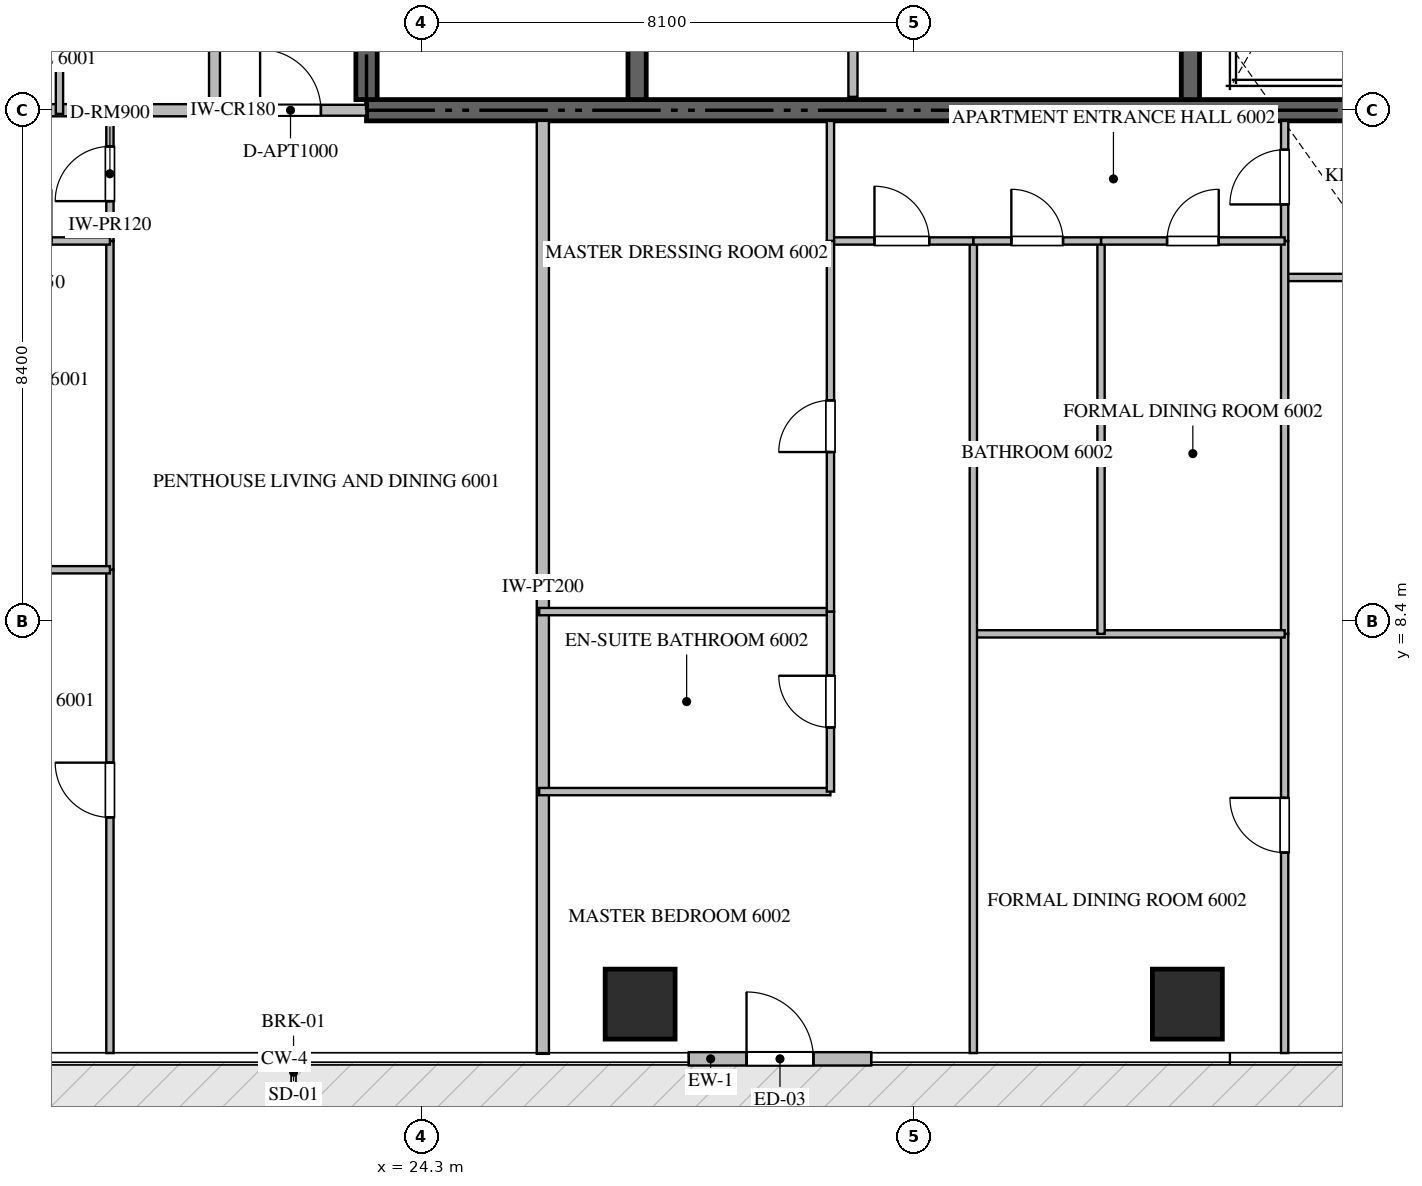
"""IFC4 building model, lengths in metres.
Left out: names, types, materials, properties, quantities, classifications, styles, units other than length and angle.
Written with IfcOpenShell. Run it as: python <this file> out.ifc"""

import sys

from ifc_helpers import new_model, si_unit, direction, frame, frame_2d, origin, origin_2d, place, context, subcontext, project, spatial, rectangle, extrude, source, transform, mapped, element, fill, save


model = new_model("IFC4")
c1 = context("Model", 3, precision=1e-05, world=origin(), true_north=direction((0.0, 1.0)))
c2 = subcontext(c1, "Body", "Model", "MODEL_VIEW")
j1 = project(units=[si_unit("LENGTHUNIT", "METRE"), si_unit("PLANEANGLEUNIT", "RADIAN")], contexts=[c1])
p1 = place(None, origin())
s1 = spatial("IfcSite", under=j1, at=p1, CompositionType="ELEMENT")
p2 = place(p1, origin())
s2 = spatial("IfcBuilding", under=s1, at=p2, CompositionType="ELEMENT")
p3 = place(p2, frame((0.0, 0.0, 241.25)))
s3 = spatial("IfcBuildingStorey", under=s2, at=p3, CompositionType="ELEMENT", Elevation=241.25)
p4 = place(p3, frame((23.4, 16.8, -0.26), z_axis=(0.0, 0.0, 1.0), x_axis=(1.0, 0.0, 0.0)))
e1 = element("IfcWall", 1, at=p4, inside=s3, PredefinedType="SHEAR", context=c2, shape_type="SweptSolid", body=[
    extrude(rectangle(XDim=18.0, YDim=0.35, at=frame_2d((9.0, 0.0))), origin(), (0.0, 0.0, 1.0), 3.848),
])
p5 = place(p3, frame((23.4, 16.975, -0.26), z_axis=(0.0, 0.0, 1.0), x_axis=(0.0, 1.0, 0.0)))
e2 = element("IfcWall", 2, at=p5, inside=s3, PredefinedType="SHEAR", context=c2, shape_type="SweptSolid", body=[
    extrude(rectangle(XDim=4.875, YDim=0.35, at=frame_2d((2.438, 0.0))), origin(), (0.0, 0.0, 1.0), 3.848),
])
p6 = place(p3, frame((27.85, 16.975, -0.26), z_axis=(0.0, 0.0, 1.0), x_axis=(0.0, 1.0, 0.0)))
e3 = element("IfcWall", 3, at=p6, inside=s3, PredefinedType="SHEAR", context=c2, shape_type="SweptSolid", body=[
    extrude(rectangle(XDim=4.875, YDim=0.3, at=frame_2d((2.438, 0.0))), origin(), (0.0, 0.0, 1.0), 3.848),
])
p7 = place(p3, frame((36.95, 16.975, -0.26), z_axis=(0.0, 0.0, 1.0), x_axis=(0.0, 1.0, 0.0)))
e4 = element("IfcWall", 4, at=p7, inside=s3, PredefinedType="SHEAR", context=c2, shape_type="SweptSolid", body=[
    extrude(rectangle(XDim=8.375, YDim=0.3, at=frame_2d((4.188, 0.0))), origin(), (0.0, 0.0, 1.0), 3.848),
])
m1 = source(origin(), c2, "Body", "SweptSolid", [
    extrude(rectangle(XDim=1.15, YDim=1.15, at=origin_2d()), origin(), (0.0, 0.0, 1.0), 3.85),
])
for number, where, z_axis, x_axis in (
    (5, (27.9, 2.1, -0.26), (0.0, 0.0, 1.0), (1.0, 0.0, 0.0)),
    (6, (36.9, 2.1, -0.26), (0.0, 0.0, 1.0), (1.0, 0.0, 0.0)),
):
    element("IfcColumn", number, at=place(p3, frame(where, z_axis=z_axis, x_axis=x_axis)), inside=s3, PredefinedType="COLUMN", context=c2, shape_type="MappedRepresentation", body=[
        mapped(m1, transform((0.0, 0.0, 0.0), scale=1.0)),
    ])
p8 = place(p3, frame((28.7, 1.2, 0.0), z_axis=(0.0, 0.0, 1.0), x_axis=(1.0, 0.0, 0.0)))
e7 = element("IfcWall", 7, at=p8, inside=s3, PredefinedType="ELEMENTEDWALL", context=c2, shape_type="SweptSolid", body=[
    extrude(rectangle(XDim=3.0, YDim=0.22, at=frame_2d((1.5, 0.0))), origin(), (0.0, 0.0, 1.0), 3.575),
])
p9 = place(p8, frame((0.95, 0.0, 0.0)))
e8 = element("IfcOpeningElement", 8, at=p9, cuts=e7, PredefinedType="OPENING", context=c2, shape_type="SweptSolid", body=[
    extrude(rectangle(XDim=1.1, YDim=2.2, at=frame_2d((0.55, 1.1))), frame((0.0, 0.12, 0.0), z_axis=(0.0, -1.0, 0.0), x_axis=(1.0, 0.0, 0.0)), (0.0, 0.0, 1.0), 0.24),
])
p10 = place(p3, frame((31.4, 17.02, 0.0), z_axis=(0.0, 0.0, 1.0), x_axis=(0.0, 1.0, 0.0)))
e9 = element("IfcWall", 9, at=p10, inside=s3, PredefinedType="PARTITIONING", context=c2, shape_type="SweptSolid", body=[
    extrude(rectangle(XDim=2.73, YDim=0.15, at=frame_2d((1.365, 0.0))), origin(), (0.0, 0.0, 1.0), 3.59),
])
p11 = place(p3, frame((26.3, 1.282, 0.0), z_axis=(0.0, 0.0, 1.0), x_axis=(0.0, 1.0, 0.0)))
e10 = element("IfcWall", 10, at=p11, inside=s3, PredefinedType="PARTITIONING", context=c2, shape_type="SweptSolid", body=[
    extrude(rectangle(XDim=15.343, YDim=0.2, at=frame_2d((7.671, 0.0))), origin(), (0.0, 0.0, 1.0), 3.59),
])
p12 = place(p3, frame((7.482, 16.8, 0.0), z_axis=(0.0, 0.0, 1.0), x_axis=(1.0, 0.0, 0.0)))
e11 = element("IfcWall", 11, at=p12, inside=s3, PredefinedType="PARTITIONING", context=c2, shape_type="SweptSolid", body=[
    extrude(rectangle(XDim=13.418, YDim=0.2, at=frame_2d((6.709, 0.0))), origin(), (0.0, 0.0, 1.0), 3.59),
])
p13 = place(p3, frame((20.902, 16.8, 0.0), z_axis=(0.0, 0.0, 1.0), x_axis=(1.0, 0.0, 0.0)))
e12 = element("IfcWall", 12, at=p13, inside=s3, PredefinedType="PARTITIONING", context=c2, shape_type="SweptSolid", body=[
    extrude(rectangle(XDim=2.496, YDim=0.18, at=frame_2d((1.248, 0.0))), origin(), (0.0, 0.0, 1.0), 3.59),
])
p14 = place(p13, frame((0.748, 0.0, 0.0)))
e13 = element("IfcOpeningElement", 13, at=p14, cuts=e12, PredefinedType="OPENING", context=c2, shape_type="SweptSolid", body=[
    extrude(rectangle(XDim=1.0, YDim=2.15, at=frame_2d((0.5, 1.075))), frame((0.0, 0.1, 0.0), z_axis=(0.0, -1.0, 0.0), x_axis=(1.0, 0.0, 0.0)), (0.0, 0.0, 1.0), 0.2),
])
p15 = place(p3, frame((20.9, 16.8, 0.0), z_axis=(0.0, 0.0, 1.0), x_axis=(0.0, 1.0, 0.0)))
e14 = element("IfcWall", 14, at=p15, inside=s3, PredefinedType="PARTITIONING", context=c2, shape_type="SweptSolid", body=[
    extrude(rectangle(XDim=16.8, YDim=0.18, at=frame_2d((8.4, 0.0))), origin(), (0.0, 0.0, 1.0), 3.59),
])
p16 = place(p15, frame((4.993, 0.0, 0.0)))
e15 = element("IfcOpeningElement", 15, at=p16, cuts=e14, PredefinedType="OPENING", context=c2, shape_type="SweptSolid", body=[
    extrude(rectangle(XDim=1.0, YDim=2.15, at=frame_2d((0.5, 1.075))), frame((0.0, 0.1, 0.0), z_axis=(0.0, -1.0, 0.0), x_axis=(1.0, 0.0, 0.0)), (0.0, 0.0, 1.0), 0.2),
])
p17 = place(p15, frame((13.351, 0.0, 0.0)))
e16 = element("IfcOpeningElement", 16, at=p17, cuts=e14, PredefinedType="OPENING", context=c2, shape_type="SweptSolid", body=[
    extrude(rectangle(XDim=1.0, YDim=2.15, at=frame_2d((0.5, 1.075))), frame((0.0, 0.1, 0.0), z_axis=(0.0, -1.0, 0.0), x_axis=(1.0, 0.0, 0.0)), (0.0, 0.0, 1.0), 0.2),
])
p18 = place(p3, frame((19.18, 14.65, 0.0), z_axis=(0.0, 0.0, 1.0), x_axis=(0.0, 1.0, 0.0)))
e17 = element("IfcWall", 17, at=p18, inside=s3, PredefinedType="PARTITIONING", context=c2, shape_type="SweptSolid", body=[
    extrude(rectangle(XDim=2.21, YDim=0.12, at=frame_2d((1.105, 0.0))), origin(), (0.0, 0.0, 1.0), 3.59),
])
p19 = place(p18, frame((0.655, 0.0, 0.0)))
e18 = element("IfcOpeningElement", 18, at=p19, cuts=e17, PredefinedType="OPENING", context=c2, shape_type="SweptSolid", body=[
    extrude(rectangle(XDim=0.9, YDim=2.1, at=frame_2d((0.45, 1.05))), frame((0.0, 0.07, 0.0), z_axis=(0.0, -1.0, 0.0), x_axis=(1.0, 0.0, 0.0)), (0.0, 0.0, 1.0), 0.14),
])
p20 = place(p3, frame((19.18, 1.295, 0.0), z_axis=(0.0, 0.0, 1.0), x_axis=(0.0, 1.0, 0.0)))
e19 = element("IfcWall", 19, at=p20, inside=s3, PredefinedType="PARTITIONING", context=c2, shape_type="SweptSolid", body=[
    extrude(rectangle(XDim=7.948, YDim=0.12, at=frame_2d((3.974, 0.0))), origin(), (0.0, 0.0, 1.0), 3.59),
])
p21 = place(p20, frame((3.876, 0.0, 0.0)))
e20 = element("IfcOpeningElement", 20, at=p21, cuts=e19, PredefinedType="OPENING", context=c2, shape_type="SweptSolid", body=[
    extrude(rectangle(XDim=0.9, YDim=2.1, at=frame_2d((0.45, 1.05))), frame((0.0, 0.07, 0.0), z_axis=(0.0, -1.0, 0.0), x_axis=(1.0, 0.0, 0.0)), (0.0, 0.0, 1.0), 0.14),
])
p22 = place(p3, frame((19.18, 9.245, 0.0), z_axis=(0.0, 0.0, 1.0), x_axis=(0.0, 1.0, 0.0)))
e21 = element("IfcWall", 21, at=p22, inside=s3, PredefinedType="PARTITIONING", context=c2, shape_type="SweptSolid", body=[
    extrude(rectangle(XDim=5.403, YDim=0.12, at=frame_2d((2.701, 0.0))), origin(), (0.0, 0.0, 1.0), 3.59),
])
p23 = place(p3, frame((14.3, 9.243, 0.0), z_axis=(0.0, 0.0, 1.0), x_axis=(1.0, 0.0, 0.0)))
e22 = element("IfcWall", 22, at=p23, inside=s3, PredefinedType="PARTITIONING", context=c2, shape_type="SweptSolid", body=[
    extrude(rectangle(XDim=4.88, YDim=0.12, at=frame_2d((2.44, 0.0))), origin(), (0.0, 0.0, 1.0), 3.59),
])
p24 = place(p3, frame((16.402, 14.65, 0.0), z_axis=(0.0, 0.0, 1.0), x_axis=(1.0, 0.0, 0.0)))
e23 = element("IfcWall", 23, at=p24, inside=s3, PredefinedType="PARTITIONING", context=c2, shape_type="SweptSolid", body=[
    extrude(rectangle(XDim=2.778, YDim=0.12, at=frame_2d((1.389, 0.0))), origin(), (0.0, 0.0, 1.0), 3.59),
])
p25 = place(p24, frame((0.964, 0.0, 0.0)))
e24 = element("IfcOpeningElement", 24, at=p25, cuts=e23, PredefinedType="OPENING", context=c2, shape_type="SweptSolid", body=[
    extrude(rectangle(XDim=0.85, YDim=2.1, at=frame_2d((0.425, 1.05))), frame((0.0, 0.07, 0.0), z_axis=(0.0, -1.0, 0.0), x_axis=(1.0, 0.0, 0.0)), (0.0, 0.0, 1.0), 0.14),
])
p26 = place(p3, frame((38.5, 14.05, 0.0), z_axis=(0.0, 0.0, 1.0), x_axis=(1.0, 0.0, 0.0)))
e25 = element("IfcWall", 25, at=p26, inside=s3, PredefinedType="PARTITIONING", context=c2, shape_type="SweptSolid", body=[
    extrude(rectangle(XDim=2.85, YDim=0.12, at=frame_2d((1.425, 0.0))), origin(), (0.0, 0.0, 1.0), 3.59),
])
p27 = place(p26, frame((1.0, 0.0, 0.0)))
e26 = element("IfcOpeningElement", 26, at=p27, cuts=e25, PredefinedType="OPENING", context=c2, shape_type="SweptSolid", body=[
    extrude(rectangle(XDim=0.85, YDim=2.1, at=frame_2d((0.425, 1.05))), frame((0.0, 0.07, 0.0), z_axis=(0.0, -1.0, 0.0), x_axis=(1.0, 0.0, 0.0)), (0.0, 0.0, 1.0), 0.14),
])
p28 = place(p3, frame((38.5, 14.65, 0.0), z_axis=(0.0, 0.0, 1.0), x_axis=(0.0, 1.0, 0.0)))
e27 = element("IfcWall", 27, at=p28, inside=s3, PredefinedType="PARTITIONING", context=c2, shape_type="SweptSolid", body=[
    extrude(rectangle(XDim=1.975, YDim=0.12, at=frame_2d((0.988, 0.0))), origin(), (0.0, 0.0, 1.0), 3.59),
])
p29 = place(p28, frame((0.601, 0.0, 0.0)))
e28 = element("IfcOpeningElement", 28, at=p29, cuts=e27, PredefinedType="OPENING", context=c2, shape_type="SweptSolid", body=[
    extrude(rectangle(XDim=0.9, YDim=2.1, at=frame_2d((0.45, 1.05))), frame((0.0, 0.07, 0.0), z_axis=(0.0, -1.0, 0.0), x_axis=(1.0, 0.0, 0.0)), (0.0, 0.0, 1.0), 0.14),
])
p30 = place(p3, frame((38.5, 1.295, 0.0), z_axis=(0.0, 0.0, 1.0), x_axis=(0.0, 1.0, 0.0)))
e29 = element("IfcWall", 29, at=p30, inside=s3, PredefinedType="PARTITIONING", context=c2, shape_type="SweptSolid", body=[
    extrude(rectangle(XDim=6.894, YDim=0.12, at=frame_2d((3.447, 0.0))), origin(), (0.0, 0.0, 1.0), 3.59),
])
p31 = place(p30, frame((3.297, 0.0, 0.0)))
e30 = element("IfcOpeningElement", 30, at=p31, cuts=e29, PredefinedType="OPENING", context=c2, shape_type="SweptSolid", body=[
    extrude(rectangle(XDim=0.9, YDim=2.1, at=frame_2d((0.45, 1.05))), frame((0.0, 0.07, 0.0), z_axis=(0.0, -1.0, 0.0), x_axis=(1.0, 0.0, 0.0)), (0.0, 0.0, 1.0), 0.14),
])
p32 = place(p3, frame((38.5, 8.191, 0.0), z_axis=(0.0, 0.0, 1.0), x_axis=(0.0, 1.0, 0.0)))
e31 = element("IfcWall", 31, at=p32, inside=s3, PredefinedType="PARTITIONING", context=c2, shape_type="SweptSolid", body=[
    extrude(rectangle(XDim=6.457, YDim=0.12, at=frame_2d((3.229, 0.0))), origin(), (0.0, 0.0, 1.0), 3.59),
])
p33 = place(p3, frame((33.38, 8.189, 0.0), z_axis=(0.0, 0.0, 1.0), x_axis=(1.0, 0.0, 0.0)))
e32 = element("IfcWall", 32, at=p33, inside=s3, PredefinedType="PARTITIONING", context=c2, shape_type="SweptSolid", body=[
    extrude(rectangle(XDim=5.12, YDim=0.12, at=frame_2d((2.56, 0.0))), origin(), (0.0, 0.0, 1.0), 3.59),
])
p34 = place(p3, frame((33.38, 1.295, 0.0), z_axis=(0.0, 0.0, 1.0), x_axis=(0.0, 1.0, 0.0)))
e33 = element("IfcWall", 33, at=p34, inside=s3, PredefinedType="PARTITIONING", context=c2, shape_type="SweptSolid", body=[
    extrude(rectangle(XDim=13.355, YDim=0.12, at=frame_2d((6.677, 0.0))), origin(), (0.0, 0.0, 1.0), 3.59),
])
p35 = place(p3, frame((35.48, 8.189, 0.0), z_axis=(0.0, 0.0, 1.0), x_axis=(0.0, 1.0, 0.0)))
e34 = element("IfcWall", 34, at=p35, inside=s3, PredefinedType="PARTITIONING", context=c2, shape_type="SweptSolid", body=[
    extrude(rectangle(XDim=6.461, YDim=0.12, at=frame_2d((3.23, 0.0))), origin(), (0.0, 0.0, 1.0), 3.59),
])
p36 = place(p3, frame((33.38, 14.65, 0.0), z_axis=(0.0, 0.0, 1.0), x_axis=(1.0, 0.0, 0.0)))
e35 = element("IfcWall", 35, at=p36, inside=s3, PredefinedType="PARTITIONING", context=c2, shape_type="SweptSolid", body=[
    extrude(rectangle(XDim=2.1, YDim=0.12, at=frame_2d((1.05, 0.0))), origin(), (0.0, 0.0, 1.0), 3.59),
])
p37 = place(p36, frame((0.625, 0.0, 0.0)))
e36 = element("IfcOpeningElement", 36, at=p37, cuts=e35, PredefinedType="OPENING", context=c2, shape_type="SweptSolid", body=[
    extrude(rectangle(XDim=0.85, YDim=2.1, at=frame_2d((0.425, 1.05))), frame((0.0, 0.07, 0.0), z_axis=(0.0, -1.0, 0.0), x_axis=(1.0, 0.0, 0.0)), (0.0, 0.0, 1.0), 0.14),
])
p38 = place(p3, frame((35.482, 14.65, 0.0), z_axis=(0.0, 0.0, 1.0), x_axis=(1.0, 0.0, 0.0)))
e37 = element("IfcWall", 37, at=p38, inside=s3, PredefinedType="PARTITIONING", context=c2, shape_type="SweptSolid", body=[
    extrude(rectangle(XDim=3.018, YDim=0.12, at=frame_2d((1.509, 0.0))), origin(), (0.0, 0.0, 1.0), 3.59),
])
p39 = place(p38, frame((1.084, 0.0, 0.0)))
e38 = element("IfcOpeningElement", 38, at=p39, cuts=e37, PredefinedType="OPENING", context=c2, shape_type="SweptSolid", body=[
    extrude(rectangle(XDim=0.85, YDim=2.1, at=frame_2d((0.425, 1.05))), frame((0.0, 0.07, 0.0), z_axis=(0.0, -1.0, 0.0), x_axis=(1.0, 0.0, 0.0)), (0.0, 0.0, 1.0), 0.14),
])
p40 = place(p3, frame((31.03, 14.65, 0.0), z_axis=(0.0, 0.0, 1.0), x_axis=(1.0, 0.0, 0.0)))
e39 = element("IfcWall", 39, at=p40, inside=s3, PredefinedType="PARTITIONING", context=c2, shape_type="SweptSolid", body=[
    extrude(rectangle(XDim=2.348, YDim=0.12, at=frame_2d((1.174, 0.0))), origin(), (0.0, 0.0, 1.0), 3.59),
])
p41 = place(p40, frame((0.724, 0.0, 0.0)))
e40 = element("IfcOpeningElement", 40, at=p41, cuts=e39, PredefinedType="OPENING", context=c2, shape_type="SweptSolid", body=[
    extrude(rectangle(XDim=0.9, YDim=2.1, at=frame_2d((0.45, 1.05))), frame((0.0, 0.07, 0.0), z_axis=(0.0, -1.0, 0.0), x_axis=(1.0, 0.0, 0.0)), (0.0, 0.0, 1.0), 0.14),
])
for number, where, z_axis, x_axis in (
    (41, (26.24, 5.595, 0.0), (0.0, 0.0, 1.0), (1.0, 0.0, 0.0)),
    (42, (26.24, 8.555, 0.0), (0.0, 0.0, 1.0), (1.0, 0.0, 0.0)),
):
    element("IfcWall", number, at=place(p3, frame(where, z_axis=z_axis, x_axis=x_axis)), inside=s3, PredefinedType="PARTITIONING", context=c2, shape_type="SweptSolid", body=[
        extrude(rectangle(XDim=4.79, YDim=0.12, at=frame_2d((2.395, 0.0))), origin(), (0.0, 0.0, 1.0), 3.59),
    ])
p42 = place(p3, frame((31.03, 5.595, 0.0), z_axis=(0.0, 0.0, 1.0), x_axis=(0.0, 1.0, 0.0)))
e43 = element("IfcWall", 43, at=p42, inside=s3, PredefinedType="PARTITIONING", context=c2, shape_type="SweptSolid", body=[
    extrude(rectangle(XDim=2.96, YDim=0.12, at=frame_2d((1.48, 0.0))), origin(), (0.0, 0.0, 1.0), 3.59),
])
p43 = place(p42, frame((1.055, 0.0, 0.0)))
e44 = element("IfcOpeningElement", 44, at=p43, cuts=e43, PredefinedType="OPENING", context=c2, shape_type="SweptSolid", body=[
    extrude(rectangle(XDim=0.85, YDim=2.1, at=frame_2d((0.425, 1.05))), frame((0.0, 0.07, 0.0), z_axis=(0.0, -1.0, 0.0), x_axis=(1.0, 0.0, 0.0)), (0.0, 0.0, 1.0), 0.14),
])
p44 = place(p3, frame((31.03, 8.557, 0.0), z_axis=(0.0, 0.0, 1.0), x_axis=(0.0, 1.0, 0.0)))
e45 = element("IfcWall", 45, at=p44, inside=s3, PredefinedType="PARTITIONING", context=c2, shape_type="SweptSolid", body=[
    extrude(rectangle(XDim=6.093, YDim=0.12, at=frame_2d((3.046, 0.0))), origin(), (0.0, 0.0, 1.0), 3.59),
])
p45 = place(p44, frame((2.622, 0.0, 0.0)))
e46 = element("IfcOpeningElement", 46, at=p45, cuts=e45, PredefinedType="OPENING", context=c2, shape_type="SweptSolid", body=[
    extrude(rectangle(XDim=0.85, YDim=2.1, at=frame_2d((0.425, 1.05))), frame((0.0, 0.07, 0.0), z_axis=(0.0, -1.0, 0.0), x_axis=(1.0, 0.0, 0.0)), (0.0, 0.0, 1.0), 0.14),
])
p46 = place(p3, frame((31.03, 14.652, 0.0), z_axis=(0.0, 0.0, 1.0), x_axis=(0.0, 1.0, 0.0)))
e47 = element("IfcWall", 47, at=p46, inside=s3, PredefinedType="PARTITIONING", context=c2, shape_type="SweptSolid", body=[
    extrude(rectangle(XDim=1.973, YDim=0.12, at=frame_2d((0.986, 0.0))), origin(), (0.0, 0.0, 1.0), 3.59),
])
p47 = place(p3, frame((18.35, 16.74, 0.0), z_axis=(0.0, 0.0, 1.0), x_axis=(0.0, 1.0, 0.0)))
e48 = element("IfcWall", 48, at=p47, inside=s3, PredefinedType="PARTITIONING", context=c2, shape_type="SweptSolid", body=[
    extrude(rectangle(XDim=2.66, YDim=0.12, at=frame_2d((1.33, 0.0))), origin(), (0.0, 0.0, 1.0), 3.59),
])
m2 = source(origin(), c2, "Body", "SweptSolid", [
    extrude(rectangle(XDim=1.1, YDim=2.2, at=frame_2d((0.55, 1.1))), frame((0.0, 0.025, 0.0), z_axis=(0.0, -1.0, 0.0), x_axis=(1.0, 0.0, 0.0)), (0.0, 0.0, 1.0), 0.05),
])
p48 = place(p9, origin())
e49 = element("IfcDoor", 49, at=p48, inside=s3, OperationType="SINGLE_SWING_LEFT", PredefinedType="DOOR", context=c2, shape_type="MappedRepresentation", body=[
    mapped(m2, transform((0.0, 0.0, 0.0), scale=1.0)),
])
fill(e8, e49)
m3 = source(origin(), c2, "Body", "SweptSolid", [
    extrude(rectangle(XDim=1.0, YDim=2.15, at=frame_2d((0.5, 1.075))), frame((0.0, 0.025, 0.0), z_axis=(0.0, -1.0, 0.0), x_axis=(1.0, 0.0, 0.0)), (0.0, 0.0, 1.0), 0.05),
])
p49 = place(p14, origin())
e50 = element("IfcDoor", 50, at=p49, inside=s3, OperationType="SINGLE_SWING_LEFT", PredefinedType="DOOR", context=c2, shape_type="MappedRepresentation", body=[
    mapped(m3, transform((0.0, 0.0, 0.0), scale=1.0)),
])
fill(e13, e50)
m4 = source(origin(), c2, "Body", "SweptSolid", [
    extrude(rectangle(XDim=0.9, YDim=2.1, at=frame_2d((0.45, 1.05))), frame((0.0, 0.025, 0.0), z_axis=(0.0, -1.0, 0.0), x_axis=(1.0, 0.0, 0.0)), (0.0, 0.0, 1.0), 0.05),
])
p50 = place(p19, origin())
e51 = element("IfcDoor", 51, at=p50, inside=s3, OperationType="SINGLE_SWING_LEFT", PredefinedType="DOOR", context=c2, shape_type="MappedRepresentation", body=[
    mapped(m4, transform((0.0, 0.0, 0.0), scale=1.0)),
])
fill(e18, e51)
p51 = place(p21, origin())
e52 = element("IfcDoor", 52, at=p51, inside=s3, OperationType="SINGLE_SWING_RIGHT", PredefinedType="DOOR", context=c2, shape_type="MappedRepresentation", body=[
    mapped(m4, transform((0.0, 0.0, 0.0), scale=1.0)),
])
fill(e20, e52)
p52 = place(p29, origin())
e53 = element("IfcDoor", 53, at=p52, inside=s3, OperationType="SINGLE_SWING_LEFT", PredefinedType="DOOR", context=c2, shape_type="MappedRepresentation", body=[
    mapped(m4, transform((0.0, 0.0, 0.0), scale=1.0)),
])
fill(e28, e53)
p53 = place(p31, origin())
e54 = element("IfcDoor", 54, at=p53, inside=s3, OperationType="SINGLE_SWING_RIGHT", PredefinedType="DOOR", context=c2, shape_type="MappedRepresentation", body=[
    mapped(m4, transform((0.0, 0.0, 0.0), scale=1.0)),
])
fill(e30, e54)
m5 = source(origin(), c2, "Body", "SweptSolid", [
    extrude(rectangle(XDim=0.85, YDim=2.1, at=frame_2d((0.425, 1.05))), frame((0.0, 0.025, 0.0), z_axis=(0.0, -1.0, 0.0), x_axis=(1.0, 0.0, 0.0)), (0.0, 0.0, 1.0), 0.05),
])
p54 = place(p37, origin())
e55 = element("IfcDoor", 55, at=p54, inside=s3, OperationType="SINGLE_SWING_LEFT", PredefinedType="DOOR", context=c2, shape_type="MappedRepresentation", body=[
    mapped(m5, transform((0.0, 0.0, 0.0), scale=1.0)),
])
fill(e36, e55)
p55 = place(p39, origin())
e56 = element("IfcDoor", 56, at=p55, inside=s3, OperationType="SINGLE_SWING_RIGHT", PredefinedType="DOOR", context=c2, shape_type="MappedRepresentation", body=[
    mapped(m5, transform((0.0, 0.0, 0.0), scale=1.0)),
])
fill(e38, e56)
p56 = place(p41, origin())
e57 = element("IfcDoor", 57, at=p56, inside=s3, OperationType="SINGLE_SWING_LEFT", PredefinedType="DOOR", context=c2, shape_type="MappedRepresentation", body=[
    mapped(m4, transform((0.0, 0.0, 0.0), scale=1.0)),
])
fill(e40, e57)
p57 = place(p43, origin())
e58 = element("IfcDoor", 58, at=p57, inside=s3, OperationType="SINGLE_SWING_RIGHT", PredefinedType="DOOR", context=c2, shape_type="MappedRepresentation", body=[
    mapped(m5, transform((0.0, 0.0, 0.0), scale=1.0)),
])
fill(e44, e58)
p58 = place(p45, origin())
e59 = element("IfcDoor", 59, at=p58, inside=s3, OperationType="SINGLE_SWING_LEFT", PredefinedType="DOOR", context=c2, shape_type="MappedRepresentation", body=[
    mapped(m5, transform((0.0, 0.0, 0.0), scale=1.0)),
])
fill(e46, e59)
save(model, sys.argv[1])
